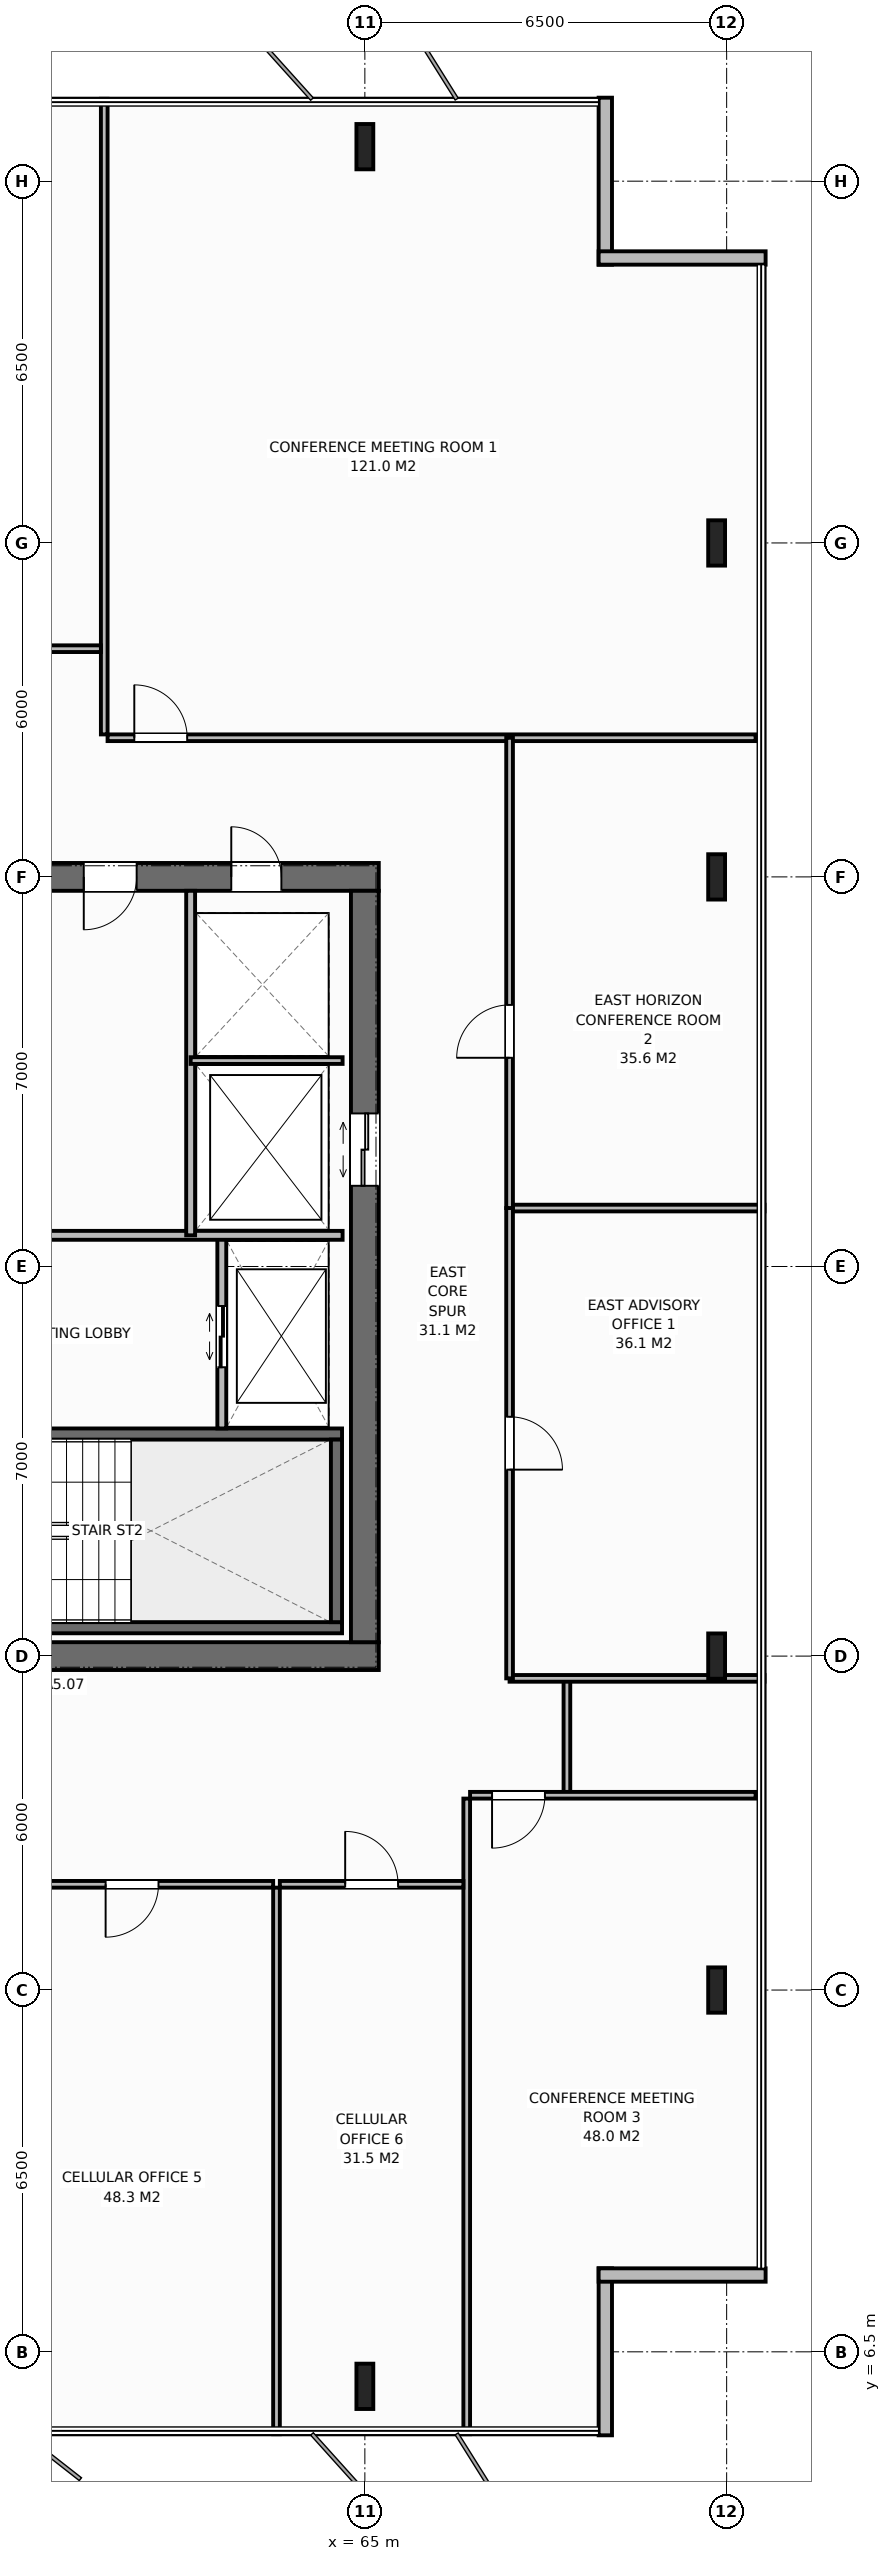
"""IFC4 building model, lengths in metres.
Left out: names, types, materials, properties, quantities, classifications, styles, units other than length and angle.
Written with IfcOpenShell. Run it as: python <this file> out.ifc"""

import sys

from ifc_helpers import new_model, si_unit, direction, frame, frame_2d, origin, origin_2d, place, context, subcontext, project, spatial, rectangle, i_section, extrude, element, fill, save


model = new_model("IFC4")
c1 = context("Model", 3, precision=1e-05, world=origin(), true_north=direction((0.0, 1.0)))
c2 = subcontext(c1, "Body", "Model", "MODEL_VIEW")
j1 = project(units=[si_unit("LENGTHUNIT", "METRE"), si_unit("PLANEANGLEUNIT", "RADIAN")], contexts=[c1])
p1 = place(None, origin())
s1 = spatial("IfcSite", under=j1, at=p1, CompositionType="ELEMENT")
p2 = place(p1, origin())
s2 = spatial("IfcBuilding", under=s1, at=p2, CompositionType="ELEMENT")
p3 = place(p2, frame((0.0, 0.0, 236.6)))
s3 = spatial("IfcBuildingStorey", under=s2, at=p3, CompositionType="ELEMENT", Elevation=236.6)
p4 = place(p3, frame((51.75, 19.0, 0.0), z_axis=(0.0, 0.0, 1.0), x_axis=(1.0, 0.0, 0.0)))
e1 = element("IfcWall", 1, at=p4, inside=s3, PredefinedType="SHEAR", context=c2, shape_type="SweptSolid", body=[
    extrude(rectangle(XDim=13.5, YDim=0.5, at=frame_2d((6.75, 0.0))), origin(), (0.0, 0.0, 1.0), 3.8),
])
p5 = place(p4, frame((2.97, 0.0, 0.0)))
e2 = element("IfcOpeningElement", 2, at=p5, cuts=e1, PredefinedType="OPENING", context=c2, shape_type="SweptSolid", body=[
    extrude(rectangle(XDim=1.4, YDim=2.2, at=frame_2d((0.7, 1.1))), frame((0.0, 0.26, 0.0), z_axis=(0.0, -1.0, 0.0), x_axis=(1.0, 0.0, 0.0)), (0.0, 0.0, 1.0), 0.52),
])
p6 = place(p3, frame((51.75, 33.0, 0.0), z_axis=(0.0, 0.0, 1.0), x_axis=(1.0, 0.0, 0.0)))
e3 = element("IfcWall", 3, at=p6, inside=s3, PredefinedType="SHEAR", context=c2, shape_type="SweptSolid", body=[
    extrude(rectangle(XDim=13.5, YDim=0.5, at=frame_2d((6.75, 0.0))), origin(), (0.0, 0.0, 1.0), 3.8),
])
p7 = place(p6, frame((2.97, 0.0, 0.0)))
e4 = element("IfcOpeningElement", 4, at=p7, cuts=e3, PredefinedType="OPENING", context=c2, shape_type="SweptSolid", body=[
    extrude(rectangle(XDim=1.4, YDim=2.2, at=frame_2d((0.7, 1.1))), frame((0.0, 0.26, 0.0), z_axis=(0.0, -1.0, 0.0), x_axis=(1.0, 0.0, 0.0)), (0.0, 0.0, 1.0), 0.52),
])
p8 = place(p6, frame((10.85, 0.0, 0.0)))
e5 = element("IfcOpeningElement", 5, at=p8, cuts=e3, PredefinedType="OPENING", context=c2, shape_type="SweptSolid", body=[
    extrude(rectangle(XDim=0.9, YDim=2.15, at=frame_2d((0.45, 1.075))), frame((0.0, 0.26, 0.0), z_axis=(0.0, -1.0, 0.0), x_axis=(1.0, 0.0, 0.0)), (0.0, 0.0, 1.0), 0.52),
])
p9 = place(p6, frame((5.8, 0.0, 0.0)))
e6 = element("IfcOpeningElement", 6, at=p9, cuts=e3, PredefinedType="OPENING", context=c2, shape_type="SweptSolid", body=[
    extrude(rectangle(XDim=0.9, YDim=2.15, at=frame_2d((0.45, 1.075))), frame((0.0, 0.26, 0.0), z_axis=(0.0, -1.0, 0.0), x_axis=(1.0, 0.0, 0.0)), (0.0, 0.0, 1.0), 0.52),
])
p10 = place(p6, frame((8.2, 0.0, 0.0)))
e7 = element("IfcOpeningElement", 7, at=p10, cuts=e3, PredefinedType="OPENING", context=c2, shape_type="SweptSolid", body=[
    extrude(rectangle(XDim=0.95, YDim=2.15, at=frame_2d((0.475, 1.075))), frame((0.0, 0.26, 0.0), z_axis=(0.0, -1.0, 0.0), x_axis=(1.0, 0.0, 0.0)), (0.0, 0.0, 1.0), 0.52),
])
p11 = place(p3, frame((65.0, 19.25, 0.0), z_axis=(0.0, 0.0, 1.0), x_axis=(0.0, 1.0, 0.0)))
e8 = element("IfcWall", 8, at=p11, inside=s3, PredefinedType="SHEAR", context=c2, shape_type="SweptSolid", body=[
    extrude(rectangle(XDim=13.5, YDim=0.5, at=frame_2d((6.75, 0.0))), origin(), (0.0, 0.0, 1.0), 3.8),
])
p12 = place(p11, frame((8.2, 0.0, 0.0)))
e9 = element("IfcOpeningElement", 9, at=p12, cuts=e8, PredefinedType="OPENING", context=c2, shape_type="SweptSolid", body=[
    extrude(rectangle(XDim=1.3, YDim=2.2, at=frame_2d((0.65, 1.1))), frame((0.0, 0.26, 0.0), z_axis=(0.0, -1.0, 0.0), x_axis=(1.0, 0.0, 0.0)), (0.0, 0.0, 1.0), 0.52),
])
p13 = place(p3, frame((56.16, 19.51, 0.0), z_axis=(0.0, 0.0, 1.0), x_axis=(1.0, 0.0, 0.0)))
e10 = element("IfcWall", 10, at=p13, inside=s3, PredefinedType="SHEAR", context=c2, shape_type="SweptSolid", body=[
    extrude(rectangle(XDim=8.43, YDim=0.2, at=frame_2d((4.215, 0.0))), origin(), (0.0, 0.0, 1.0), 3.8),
])
p14 = place(p3, frame((56.16, 22.99, 0.0), z_axis=(0.0, 0.0, 1.0), x_axis=(1.0, 0.0, 0.0)))
e11 = element("IfcWall", 11, at=p14, inside=s3, PredefinedType="SHEAR", context=c2, shape_type="SweptSolid", body=[
    extrude(rectangle(XDim=8.43, YDim=0.2, at=frame_2d((4.215, 0.0))), origin(), (0.0, 0.0, 1.0), 3.8),
])
p15 = place(p14, frame((0.45, 0.0, 0.0)))
e12 = element("IfcOpeningElement", 12, at=p15, cuts=e11, PredefinedType="OPENING", context=c2, shape_type="SweptSolid", body=[
    extrude(rectangle(XDim=1.0, YDim=2.15, at=frame_2d((0.5, 1.075))), frame((0.0, 0.11, 0.0), z_axis=(0.0, -1.0, 0.0), x_axis=(1.0, 0.0, 0.0)), (0.0, 0.0, 1.0), 0.22),
])
p16 = place(p3, frame((64.49, 19.61, 0.0), z_axis=(0.0, 0.0, 1.0), x_axis=(0.0, 1.0, 0.0)))
e13 = element("IfcWall", 13, at=p16, inside=s3, PredefinedType="SHEAR", context=c2, shape_type="SweptSolid", body=[
    extrude(rectangle(XDim=3.28, YDim=0.2, at=frame_2d((1.64, 0.0))), origin(), (0.0, 0.0, 1.0), 3.8),
])
for number, where, z_axis, x_axis in (
    (14, (65.0, 5.88, 0.0), (0.0, 0.0, 1.0), (1.0, 0.0, 0.0)),
    (15, (65.0, 46.12, 0.0), (0.0, 0.0, 1.0), (1.0, 0.0, 0.0)),
    (16, (71.32, 13.0, 0.0), (0.0, 0.0, 1.0), (1.0, 0.0, 0.0)),
    (17, (71.32, 19.0, 0.0), (0.0, 0.0, 1.0), (1.0, 0.0, 0.0)),
    (18, (71.32, 33.0, 0.0), (0.0, 0.0, 1.0), (1.0, 0.0, 0.0)),
    (19, (71.32, 39.0, 0.0), (0.0, 0.0, 1.0), (1.0, 0.0, 0.0)),
):
    element("IfcColumn", number, at=place(p3, frame(where, z_axis=z_axis, x_axis=x_axis)), inside=s3, PredefinedType="COLUMN", context=c2, shape_type="SweptSolid", body=[
        extrude(i_section(OverallWidth=0.303, OverallDepth=0.814, WebThickness=0.021, FlangeThickness=0.04, at=origin_2d()), origin(), (0.0, 0.0, 1.0), 3.8),
    ])
for number, where, z_axis, x_axis in (
    (20, (69.32, 47.0, 0.0), (0.0, 0.0, 1.0), (0.0, -1.0, 0.0)),
    (21, (69.2, 44.12, 0.0), (0.0, 0.0, 1.0), (1.0, 0.0, 0.0)),
    (22, (69.32, 8.0, 0.0), (0.0, 0.0, 1.0), (0.0, -1.0, 0.0)),
    (23, (72.2, 7.88, 0.0), (0.0, 0.0, 1.0), (-1.0, 0.0, 0.0)),
):
    element("IfcWall", number, at=place(p3, frame(where, z_axis=z_axis, x_axis=x_axis)), inside=s3, PredefinedType="STANDARD", context=c2, shape_type="SweptSolid", body=[
        extrude(rectangle(XDim=3.0, YDim=0.24, at=frame_2d((1.5, 0.0))), origin(), (0.0, 0.0, 1.0), 3.58),
    ])
p17 = place(p3, frame((62.43, 23.09, 0.0), z_axis=(0.0, 0.0, 1.0), x_axis=(0.0, 1.0, 0.0)))
e24 = element("IfcWall", 24, at=p17, inside=s3, PredefinedType="STANDARD", context=c2, shape_type="SweptSolid", body=[
    extrude(rectangle(XDim=3.47, YDim=0.16, at=frame_2d((1.735, 0.0))), origin(), (0.0, 0.0, 1.0), 3.58),
])
p18 = place(p17, frame((1.1, 0.0, 0.0)))
e25 = element("IfcOpeningElement", 25, at=p18, cuts=e24, PredefinedType="OPENING", context=c2, shape_type="SweptSolid", body=[
    extrude(rectangle(XDim=1.1, YDim=2.2, at=frame_2d((0.55, 1.1))), frame((0.0, 0.09, 0.0), z_axis=(0.0, -1.0, 0.0), x_axis=(1.0, 0.0, 0.0)), (0.0, 0.0, 1.0), 0.18),
])
p19 = place(p3, frame((56.26, 26.56, 0.0), z_axis=(0.0, 0.0, 1.0), x_axis=(1.0, 0.0, 0.0)))
e26 = element("IfcWall", 26, at=p19, inside=s3, PredefinedType="STANDARD", context=c2, shape_type="SweptSolid", body=[
    extrude(rectangle(XDim=8.34, YDim=0.16, at=frame_2d((4.17, 0.0))), origin(), (0.0, 0.0, 1.0), 3.58),
])
p20 = place(p3, frame((61.87, 26.56, 0.0), z_axis=(0.0, 0.0, 1.0), x_axis=(0.0, 1.0, 0.0)))
e27 = element("IfcWall", 27, at=p20, inside=s3, PredefinedType="STANDARD", context=c2, shape_type="SweptSolid", body=[
    extrude(rectangle(XDim=6.19, YDim=0.16, at=frame_2d((3.095, 0.0))), origin(), (0.0, 0.0, 1.0), 3.58),
])
p21 = place(p3, frame((61.87, 29.7, 0.0), z_axis=(0.0, 0.0, 1.0), x_axis=(1.0, 0.0, 0.0)))
e28 = element("IfcWall", 28, at=p21, inside=s3, PredefinedType="PARTITIONING", context=c2, shape_type="SweptSolid", body=[
    extrude(rectangle(XDim=2.73, YDim=0.12, at=frame_2d((1.365, 0.0))), origin(), (0.0, 0.0, 1.0), 3.58),
])
p22 = place(p3, frame((68.63, 16.5, 0.0), z_axis=(0.0, 0.0, 1.0), x_axis=(0.0, 1.0, 0.0)))
e29 = element("IfcWall", 29, at=p22, inside=s3, PredefinedType="PARTITIONING", context=c2, shape_type="SweptSolid", body=[
    extrude(rectangle(XDim=2.1, YDim=0.12, at=frame_2d((1.05, 0.0))), origin(), (0.0, 0.0, 1.0), 3.58),
])
p23 = place(p3, frame((60.318, 35.56, 0.0), z_axis=(0.0, 0.0, 1.0), x_axis=(0.0, 1.0, 0.0)))
e30 = element("IfcWall", 30, at=p23, inside=s3, PredefinedType="PARTITIONING", context=c2, shape_type="SweptSolid", body=[
    extrude(rectangle(XDim=11.42, YDim=0.12, at=frame_2d((5.71, 0.0))), origin(), (0.0, 0.0, 1.0), 3.58),
])
p24 = place(p3, frame((46.424, 37.1, 0.0), z_axis=(0.0, 0.0, 1.0), x_axis=(1.0, 0.0, 0.0)))
e31 = element("IfcWall", 31, at=p24, inside=s3, PredefinedType="PARTITIONING", context=c2, shape_type="SweptSolid", body=[
    extrude(rectangle(XDim=13.834, YDim=0.12, at=frame_2d((6.917, 0.0))), origin(), (0.0, 0.0, 1.0), 3.58),
])
p25 = place(p24, frame((8.734, 0.0, 0.0)))
e32 = element("IfcOpeningElement", 32, at=p25, cuts=e31, PredefinedType="OPENING", context=c2, shape_type="SweptSolid", body=[
    extrude(rectangle(XDim=0.95, YDim=2.15, at=frame_2d((0.475, 1.075))), frame((0.0, 0.07, 0.0), z_axis=(0.0, -1.0, 0.0), x_axis=(1.0, 0.0, 0.0)), (0.0, 0.0, 1.0), 0.14),
])
p26 = place(p3, frame((60.378, 35.5, 0.0), z_axis=(0.0, 0.0, 1.0), x_axis=(1.0, 0.0, 0.0)))
e33 = element("IfcWall", 33, at=p26, inside=s3, PredefinedType="PARTITIONING", context=c2, shape_type="SweptSolid", body=[
    extrude(rectangle(XDim=11.642, YDim=0.12, at=frame_2d((5.821, 0.0))), origin(), (0.0, 0.0, 1.0), 3.58),
])
p27 = place(p26, frame((0.48, 0.0, 0.0)))
e34 = element("IfcOpeningElement", 34, at=p27, cuts=e33, PredefinedType="OPENING", context=c2, shape_type="SweptSolid", body=[
    extrude(rectangle(XDim=0.95, YDim=2.15, at=frame_2d((0.475, 1.075))), frame((0.0, 0.07, 0.0), z_axis=(0.0, -1.0, 0.0), x_axis=(1.0, 0.0, 0.0)), (0.0, 0.0, 1.0), 0.14),
])
p28 = place(p3, frame((63.413, 5.02, 0.0), z_axis=(0.0, 0.0, 1.0), x_axis=(0.0, 1.0, 0.0)))
e35 = element("IfcWall", 35, at=p28, inside=s3, PredefinedType="PARTITIONING", context=c2, shape_type="SweptSolid", body=[
    extrude(rectangle(XDim=9.82, YDim=0.12, at=frame_2d((4.91, 0.0))), origin(), (0.0, 0.0, 1.0), 3.58),
])
p29 = place(p3, frame((58.283, 14.9, 0.0), z_axis=(0.0, 0.0, 1.0), x_axis=(1.0, 0.0, 0.0)))
e36 = element("IfcWall", 36, at=p29, inside=s3, PredefinedType="PARTITIONING", context=c2, shape_type="SweptSolid", body=[
    extrude(rectangle(XDim=5.07, YDim=0.12, at=frame_2d((2.535, 0.0))), origin(), (0.0, 0.0, 1.0), 3.58),
])
p30 = place(p29, frame((2.06, 0.0, 0.0)))
e37 = element("IfcOpeningElement", 37, at=p30, cuts=e36, PredefinedType="OPENING", context=c2, shape_type="SweptSolid", body=[
    extrude(rectangle(XDim=0.95, YDim=2.15, at=frame_2d((0.475, 1.075))), frame((0.0, 0.07, 0.0), z_axis=(0.0, -1.0, 0.0), x_axis=(1.0, 0.0, 0.0)), (0.0, 0.0, 1.0), 0.14),
])
p31 = place(p3, frame((66.83, 5.02, 0.0), z_axis=(0.0, 0.0, 1.0), x_axis=(0.0, 1.0, 0.0)))
e38 = element("IfcWall", 38, at=p31, inside=s3, PredefinedType="PARTITIONING", context=c2, shape_type="SweptSolid", body=[
    extrude(rectangle(XDim=11.42, YDim=0.12, at=frame_2d((5.71, 0.0))), origin(), (0.0, 0.0, 1.0), 3.58),
])
p32 = place(p3, frame((63.472, 14.9, 0.0), z_axis=(0.0, 0.0, 1.0), x_axis=(1.0, 0.0, 0.0)))
e39 = element("IfcWall", 39, at=p32, inside=s3, PredefinedType="PARTITIONING", context=c2, shape_type="SweptSolid", body=[
    extrude(rectangle(XDim=3.298, YDim=0.12, at=frame_2d((1.649, 0.0))), origin(), (0.0, 0.0, 1.0), 3.58),
])
p33 = place(p32, frame((1.174, 0.0, 0.0)))
e40 = element("IfcOpeningElement", 40, at=p33, cuts=e39, PredefinedType="OPENING", context=c2, shape_type="SweptSolid", body=[
    extrude(rectangle(XDim=0.95, YDim=2.15, at=frame_2d((0.475, 1.075))), frame((0.0, 0.07, 0.0), z_axis=(0.0, -1.0, 0.0), x_axis=(1.0, 0.0, 0.0)), (0.0, 0.0, 1.0), 0.14),
])
p34 = place(p3, frame((66.89, 16.5, 0.0), z_axis=(0.0, 0.0, 1.0), x_axis=(1.0, 0.0, 0.0)))
e41 = element("IfcWall", 41, at=p34, inside=s3, PredefinedType="PARTITIONING", context=c2, shape_type="SweptSolid", body=[
    extrude(rectangle(XDim=5.13, YDim=0.12, at=frame_2d((2.565, 0.0))), origin(), (0.0, 0.0, 1.0), 3.58),
])
p35 = place(p34, frame((0.395, 0.0, 0.0)))
e42 = element("IfcOpeningElement", 42, at=p35, cuts=e41, PredefinedType="OPENING", context=c2, shape_type="SweptSolid", body=[
    extrude(rectangle(XDim=0.95, YDim=2.15, at=frame_2d((0.475, 1.075))), frame((0.0, 0.07, 0.0), z_axis=(0.0, -1.0, 0.0), x_axis=(1.0, 0.0, 0.0)), (0.0, 0.0, 1.0), 0.14),
])
for number, where, z_axis, x_axis in (
    (43, (67.6, 18.6, 0.0), (0.0, 0.0, 1.0), (1.0, 0.0, 0.0)),
    (44, (67.6, 27.05, 0.0), (0.0, 0.0, 1.0), (1.0, 0.0, 0.0)),
):
    element("IfcWall", number, at=place(p3, frame(where, z_axis=z_axis, x_axis=x_axis)), inside=s3, PredefinedType="PARTITIONING", context=c2, shape_type="SweptSolid", body=[
        extrude(rectangle(XDim=4.58, YDim=0.12, at=frame_2d((2.29, 0.0))), origin(), (0.0, 0.0, 1.0), 3.58),
    ])
p36 = place(p3, frame((67.6, 18.6, 0.0), z_axis=(0.0, 0.0, 1.0), x_axis=(0.0, 1.0, 0.0)))
e45 = element("IfcWall", 45, at=p36, inside=s3, PredefinedType="PARTITIONING", context=c2, shape_type="SweptSolid", body=[
    extrude(rectangle(XDim=8.45, YDim=0.12, at=frame_2d((4.225, 0.0))), origin(), (0.0, 0.0, 1.0), 3.58),
])
p37 = place(p36, frame((3.75, 0.0, 0.0)))
e46 = element("IfcOpeningElement", 46, at=p37, cuts=e45, PredefinedType="OPENING", context=c2, shape_type="SweptSolid", body=[
    extrude(rectangle(XDim=0.95, YDim=2.15, at=frame_2d((0.475, 1.075))), frame((0.0, 0.07, 0.0), z_axis=(0.0, -1.0, 0.0), x_axis=(1.0, 0.0, 0.0)), (0.0, 0.0, 1.0), 0.14),
])
p38 = place(p3, frame((67.6, 27.05, 0.0), z_axis=(0.0, 0.0, 1.0), x_axis=(0.0, 1.0, 0.0)))
e47 = element("IfcWall", 47, at=p38, inside=s3, PredefinedType="PARTITIONING", context=c2, shape_type="SweptSolid", body=[
    extrude(rectangle(XDim=8.45, YDim=0.12, at=frame_2d((4.225, 0.0))), origin(), (0.0, 0.0, 1.0), 3.58),
])
p39 = place(p38, frame((2.7, 0.0, 0.0)))
e48 = element("IfcOpeningElement", 48, at=p39, cuts=e47, PredefinedType="OPENING", context=c2, shape_type="SweptSolid", body=[
    extrude(rectangle(XDim=0.95, YDim=2.15, at=frame_2d((0.475, 1.075))), frame((0.0, 0.07, 0.0), z_axis=(0.0, -1.0, 0.0), x_axis=(1.0, 0.0, 0.0)), (0.0, 0.0, 1.0), 0.14),
])
p40 = place(p18, origin())
e49 = element("IfcDoor", 49, at=p40, inside=s3, OperationType="DOUBLE_DOOR_SLIDING", PredefinedType="DOOR", context=c2, shape_type="SweptSolid", body=[
    extrude(rectangle(XDim=1.1, YDim=2.2, at=frame_2d((0.55, 1.1))), frame((0.0, 0.025, 0.0), z_axis=(0.0, -1.0, 0.0), x_axis=(1.0, 0.0, 0.0)), (0.0, 0.0, 1.0), 0.05),
])
fill(e25, e49)
p41 = place(p12, origin())
e50 = element("IfcDoor", 50, at=p41, inside=s3, OperationType="DOUBLE_DOOR_SLIDING", PredefinedType="DOOR", context=c2, shape_type="SweptSolid", body=[
    extrude(rectangle(XDim=1.3, YDim=2.2, at=frame_2d((0.65, 1.1))), frame((0.0, 0.025, 0.0), z_axis=(0.0, -1.0, 0.0), x_axis=(1.0, 0.0, 0.0)), (0.0, 0.0, 1.0), 0.05),
])
fill(e9, e50)
p42 = place(p8, origin())
e51 = element("IfcDoor", 51, at=p42, inside=s3, OperationType="SINGLE_SWING_LEFT", PredefinedType="DOOR", context=c2, shape_type="SweptSolid", body=[
    extrude(rectangle(XDim=0.9, YDim=2.15, at=frame_2d((0.45, 1.075))), frame((0.0, -0.025, 0.0), z_axis=(0.0, -1.0, 0.0), x_axis=(1.0, 0.0, 0.0)), (0.0, 0.0, 1.0), 0.05),
])
fill(e5, e51)
p43 = place(p10, origin())
e52 = element("IfcDoor", 52, at=p43, inside=s3, OperationType="SINGLE_SWING_RIGHT", PredefinedType="DOOR", context=c2, shape_type="SweptSolid", body=[
    extrude(rectangle(XDim=0.95, YDim=2.15, at=frame_2d((0.475, 1.075))), frame((0.0, -0.025, 0.0), z_axis=(0.0, -1.0, 0.0), x_axis=(1.0, 0.0, 0.0)), (0.0, 0.0, 1.0), 0.05),
])
fill(e7, e52)
p44 = place(p27, origin())
e53 = element("IfcDoor", 53, at=p44, inside=s3, OperationType="SINGLE_SWING_LEFT", PredefinedType="DOOR", context=c2, shape_type="SweptSolid", body=[
    extrude(rectangle(XDim=0.95, YDim=2.15, at=frame_2d((0.475, 1.075))), frame((0.0, 0.025, 0.0), z_axis=(0.0, -1.0, 0.0), x_axis=(1.0, 0.0, 0.0)), (0.0, 0.0, 1.0), 0.05),
])
fill(e34, e53)
p45 = place(p30, origin())
e54 = element("IfcDoor", 54, at=p45, inside=s3, OperationType="SINGLE_SWING_RIGHT", PredefinedType="DOOR", context=c2, shape_type="SweptSolid", body=[
    extrude(rectangle(XDim=0.95, YDim=2.15, at=frame_2d((0.475, 1.075))), frame((0.0, 0.025, 0.0), z_axis=(0.0, -1.0, 0.0), x_axis=(1.0, 0.0, 0.0)), (0.0, 0.0, 1.0), 0.05),
])
fill(e37, e54)
p46 = place(p33, origin())
e55 = element("IfcDoor", 55, at=p46, inside=s3, OperationType="SINGLE_SWING_LEFT", PredefinedType="DOOR", context=c2, shape_type="SweptSolid", body=[
    extrude(rectangle(XDim=0.95, YDim=2.15, at=frame_2d((0.475, 1.075))), frame((0.0, 0.025, 0.0), z_axis=(0.0, -1.0, 0.0), x_axis=(1.0, 0.0, 0.0)), (0.0, 0.0, 1.0), 0.05),
])
fill(e40, e55)
p47 = place(p35, origin())
e56 = element("IfcDoor", 56, at=p47, inside=s3, OperationType="SINGLE_SWING_RIGHT", PredefinedType="DOOR", context=c2, shape_type="SweptSolid", body=[
    extrude(rectangle(XDim=0.95, YDim=2.15, at=frame_2d((0.475, 1.075))), frame((0.0, 0.025, 0.0), z_axis=(0.0, -1.0, 0.0), x_axis=(1.0, 0.0, 0.0)), (0.0, 0.0, 1.0), 0.05),
])
fill(e42, e56)
p48 = place(p37, origin())
e57 = element("IfcDoor", 57, at=p48, inside=s3, OperationType="SINGLE_SWING_RIGHT", PredefinedType="DOOR", context=c2, shape_type="SweptSolid", body=[
    extrude(rectangle(XDim=0.95, YDim=2.15, at=frame_2d((0.475, 1.075))), frame((0.0, 0.025, 0.0), z_axis=(0.0, -1.0, 0.0), x_axis=(1.0, 0.0, 0.0)), (0.0, 0.0, 1.0), 0.05),
])
fill(e46, e57)
p49 = place(p39, origin())
e58 = element("IfcDoor", 58, at=p49, inside=s3, OperationType="SINGLE_SWING_LEFT", PredefinedType="DOOR", context=c2, shape_type="SweptSolid", body=[
    extrude(rectangle(XDim=0.95, YDim=2.15, at=frame_2d((0.475, 1.075))), frame((0.0, 0.025, 0.0), z_axis=(0.0, -1.0, 0.0), x_axis=(1.0, 0.0, 0.0)), (0.0, 0.0, 1.0), 0.05),
])
fill(e48, e58)
save(model, sys.argv[1])
